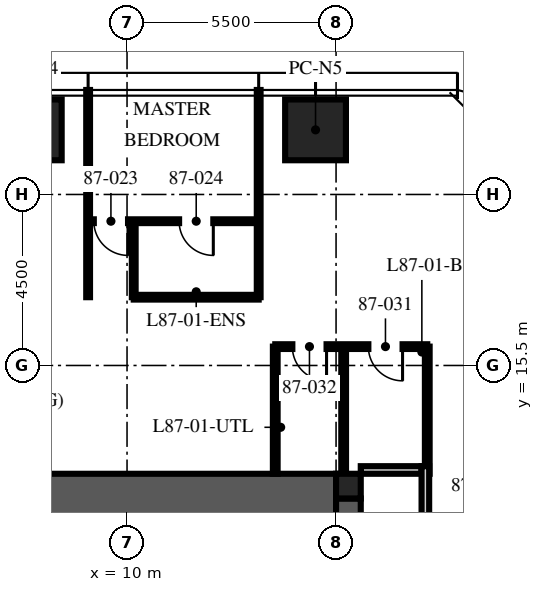
"""IFC4 building model, lengths in metres.
Left out: names, types, materials, properties, quantities, classifications, styles, units other than length and angle.
Written with IfcOpenShell. Run it as: python <this file> out.ifc"""

import sys

from ifc_helpers import new_model, si_unit, direction, frame, frame_2d, origin, origin_2d, place, context, subcontext, project, spatial, rectangle, extrude, element, fill, save


model = new_model("IFC4")
c1 = context("Model", 3, precision=1e-05, world=origin(), true_north=direction((0.0, 1.0)))
c2 = subcontext(c1, "Body", "Model", "MODEL_VIEW")
j1 = project(units=[si_unit("LENGTHUNIT", "METRE"), si_unit("PLANEANGLEUNIT", "RADIAN")], contexts=[c1])
p1 = place(None, origin())
s1 = spatial("IfcSite", under=j1, at=p1, CompositionType="ELEMENT")
p2 = place(p1, origin())
s2 = spatial("IfcBuilding", under=s1, at=p2, CompositionType="ELEMENT")
p3 = place(p2, frame((0.0, 0.0, 345.75)))
s3 = spatial("IfcBuildingStorey", under=s2, at=p3, CompositionType="ELEMENT", Elevation=345.75)
p4 = place(p3, frame((15.5, -12.0, -0.25), z_axis=(0.0, 0.0, 1.0), x_axis=(0.0, 1.0, 0.0)))
e1 = element("IfcWall", 1, at=p4, inside=s3, PredefinedType="SHEAR", context=c2, shape_type="SweptSolid", body=[
    extrude(rectangle(XDim=24.0, YDim=1.3, at=frame_2d((12.0, 0.0))), origin(), (0.0, 0.0, 1.0), 3.75),
])
p5 = place(p4, frame((3.125, 0.0, 0.25)))
e2 = element("IfcOpeningElement", 2, at=p5, cuts=e1, PredefinedType="OPENING", context=c2, shape_type="SweptSolid", body=[
    extrude(rectangle(XDim=1.2, YDim=2.1, at=frame_2d((0.6, 1.05))), frame((0.0, 0.66, 0.0), z_axis=(0.0, -1.0, 0.0), x_axis=(1.0, 0.0, 0.0)), (0.0, 0.0, 1.0), 1.32),
])
p6 = place(p4, frame((19.375, 0.0, 0.25)))
e3 = element("IfcOpeningElement", 3, at=p6, cuts=e1, PredefinedType="OPENING", context=c2, shape_type="SweptSolid", body=[
    extrude(rectangle(XDim=1.8, YDim=2.1, at=frame_2d((0.9, 1.05))), frame((0.0, 0.66, 0.0), z_axis=(0.0, -1.0, 0.0), x_axis=(1.0, 0.0, 0.0)), (0.0, 0.0, 1.0), 1.32),
])
p7 = place(p3, frame((-15.5, 12.0, -0.25), z_axis=(0.0, 0.0, 1.0), x_axis=(1.0, 0.0, 0.0)))
e4 = element("IfcWall", 4, at=p7, inside=s3, PredefinedType="SHEAR", context=c2, shape_type="SweptSolid", body=[
    extrude(rectangle(XDim=31.0, YDim=1.3, at=frame_2d((15.5, 0.0))), origin(), (0.0, 0.0, 1.0), 3.75),
])
p8 = place(p3, frame((15.825, 12.325, -0.25), z_axis=(0.0, 0.0, 1.0), x_axis=(1.0, 0.0, 0.0)))
e5 = element("IfcColumn", 5, at=p8, inside=s3, PredefinedType="COLUMN", context=c2, shape_type="SweptSolid", body=[
    extrude(rectangle(XDim=0.65, YDim=0.65, at=origin_2d()), origin(), (0.0, 0.0, 1.0), 3.75),
])
for number, where, z_axis, x_axis in (
    (6, (7.48, 21.7, 0.0), (0.0, 0.0, 1.0), (1.0, 0.0, 0.0)),
    (7, (14.96, 21.7, 0.0), (0.0, 0.0, 1.0), (1.0, 0.0, 0.0)),
):
    element("IfcColumn", number, at=place(p3, frame(where, z_axis=z_axis, x_axis=x_axis)), inside=s3, PredefinedType="COLUMN", context=c2, shape_type="SweptSolid", body=[
        extrude(rectangle(XDim=1.6, YDim=1.6, at=origin_2d()), origin(), (0.0, 0.0, 1.0), 3.75),
    ])
p9 = place(p3, frame((16.15, 12.75, 0.0), z_axis=(0.0, 0.0, 1.0), x_axis=(1.0, 0.0, 0.0)))
e8 = element("IfcWall", 8, at=p9, inside=s3, PredefinedType="PARTITIONING", context=c2, shape_type="SweptSolid", body=[
    extrude(rectangle(XDim=1.6, YDim=0.2, at=frame_2d((0.8, 0.0))), origin(), (0.0, 0.0, 1.0), 2.5),
])
for number, where, z_axis, x_axis in (
    (9, (13.464, 17.296, 0.0), (0.0, 0.0, 1.0), (0.0, 1.0, 0.0)),
    (10, (8.976, 17.296, 0.0), (0.0, 0.0, 1.0), (0.0, 1.0, 0.0)),
):
    element("IfcWall", number, at=place(p3, frame(where, z_axis=z_axis, x_axis=x_axis)), inside=s3, PredefinedType="PARTITIONING", context=c2, shape_type="SweptSolid", body=[
        extrude(rectangle(XDim=5.454, YDim=0.1, at=frame_2d((2.727, 0.0))), origin(), (0.0, 0.0, 1.0), 2.91),
    ])
p10 = place(p3, frame((13.464, 19.296, 0.0), z_axis=(0.0, 0.0, 1.0), x_axis=(-1.0, 0.0, 0.0)))
e11 = element("IfcWall", 11, at=p10, inside=s3, PredefinedType="PARTITIONING", context=c2, shape_type="SweptSolid", body=[
    extrude(rectangle(XDim=4.488, YDim=0.1, at=frame_2d((2.244, 0.0))), origin(), (0.0, 0.0, 1.0), 2.81),
])
p11 = place(p10, frame((3.438, 0.0, 0.0)))
e12 = element("IfcOpeningElement", 12, at=p11, cuts=e11, PredefinedType="OPENING", context=c2, shape_type="SweptSolid", body=[
    extrude(rectangle(XDim=0.9, YDim=2.1, at=frame_2d((0.45, 1.05))), frame((0.0, 0.06, 0.0), z_axis=(0.0, -1.0, 0.0), x_axis=(1.0, 0.0, 0.0)), (0.0, 0.0, 1.0), 0.12),
])
p12 = place(p10, frame((1.194, 0.0, 0.0)))
e13 = element("IfcOpeningElement", 13, at=p12, cuts=e11, PredefinedType="OPENING", context=c2, shape_type="SweptSolid", body=[
    extrude(rectangle(XDim=0.9, YDim=2.1, at=frame_2d((0.45, 1.05))), frame((0.0, 0.06, 0.0), z_axis=(0.0, -1.0, 0.0), x_axis=(1.0, 0.0, 0.0)), (0.0, 0.0, 1.0), 0.12),
])
p13 = place(p3, frame((10.176, 17.296, 0.0), z_axis=(0.0, 0.0, 1.0), x_axis=(0.0, 1.0, 0.0)))
e14 = element("IfcWall", 14, at=p13, inside=s3, PredefinedType="PARTITIONING", context=c2, shape_type="SweptSolid", body=[
    extrude(rectangle(XDim=2.0, YDim=0.1, at=frame_2d((1.0, 0.0))), origin(), (0.0, 0.0, 1.0), 3.5),
])
p14 = place(p3, frame((13.464, 17.296, 0.0), z_axis=(0.0, 0.0, 1.0), x_axis=(-1.0, 0.0, 0.0)))
e15 = element("IfcWall", 15, at=p14, inside=s3, PredefinedType="PARTITIONING", context=c2, shape_type="SweptSolid", body=[
    extrude(rectangle(XDim=3.288, YDim=0.125, at=frame_2d((1.644, 0.0))), origin(), (0.0, 0.0, 1.0), 2.81),
])
p15 = place(p3, frame((17.9, 15.996, 0.0), z_axis=(0.0, 0.0, 1.0), x_axis=(-1.0, 0.0, 0.0)))
e16 = element("IfcWall", 16, at=p15, inside=s3, PredefinedType="PARTITIONING", context=c2, shape_type="SweptSolid", body=[
    extrude(rectangle(XDim=4.0, YDim=0.125, at=frame_2d((2.0, 0.0))), origin(), (0.0, 0.0, 1.0), 2.5),
])
p16 = place(p15, frame((0.65, 0.0, 0.0)))
e17 = element("IfcOpeningElement", 17, at=p16, cuts=e16, PredefinedType="OPENING", context=c2, shape_type="SweptSolid", body=[
    extrude(rectangle(XDim=0.9, YDim=2.1, at=frame_2d((0.45, 1.05))), frame((0.0, 0.073, 0.0), z_axis=(0.0, -1.0, 0.0), x_axis=(1.0, 0.0, 0.0)), (0.0, 0.0, 1.0), 0.145),
])
p17 = place(p15, frame((2.65, 0.0, 0.0)))
e18 = element("IfcOpeningElement", 18, at=p17, cuts=e16, PredefinedType="OPENING", context=c2, shape_type="SweptSolid", body=[
    extrude(rectangle(XDim=0.9, YDim=2.1, at=frame_2d((0.45, 1.05))), frame((0.0, 0.073, 0.0), z_axis=(0.0, -1.0, 0.0), x_axis=(1.0, 0.0, 0.0)), (0.0, 0.0, 1.0), 0.145),
])
for number, where, z_axis, x_axis in (
    (19, (17.9, 12.65, 0.0), (0.0, 0.0, 1.0), (0.0, 1.0, 0.0)),
    (20, (15.7, 12.65, 0.0), (0.0, 0.0, 1.0), (0.0, 1.0, 0.0)),
):
    element("IfcWall", number, at=place(p3, frame(where, z_axis=z_axis, x_axis=x_axis)), inside=s3, PredefinedType="PARTITIONING", context=c2, shape_type="SweptSolid", body=[
        extrude(rectangle(XDim=3.346, YDim=0.125, at=frame_2d((1.673, 0.0))), origin(), (0.0, 0.0, 1.0), 2.5),
    ])
p18 = place(p3, frame((13.9, 12.65, 0.0), z_axis=(0.0, 0.0, 1.0), x_axis=(0.0, 1.0, 0.0)))
e21 = element("IfcWall", 21, at=p18, inside=s3, PredefinedType="PARTITIONING", context=c2, shape_type="SweptSolid", body=[
    extrude(rectangle(XDim=3.346, YDim=0.125, at=frame_2d((1.673, 0.0))), origin(), (0.0, 0.0, 1.0), 3.5),
])
p19 = place(p3, frame((17.85, -12.65, 0.0), z_axis=(0.0, 0.0, 1.0), x_axis=(0.0, 1.0, 0.0)))
e22 = element("IfcWall", 22, at=p19, inside=s3, PredefinedType="PARTITIONING", context=c2, shape_type="SweptSolid", body=[
    extrude(rectangle(XDim=25.5, YDim=0.2, at=frame_2d((12.75, 0.0))), origin(), (0.0, 0.0, 1.0), 2.81),
])
p20 = place(p19, frame((23.186, 0.0, 0.0)))
e23 = element("IfcOpeningElement", 23, at=p20, cuts=e22, PredefinedType="OPENING", context=c2, shape_type="SweptSolid", body=[
    extrude(rectangle(XDim=1.0, YDim=2.2, at=frame_2d((0.5, 1.1))), frame((0.0, 0.11, 0.0), z_axis=(0.0, -1.0, 0.0), x_axis=(1.0, 0.0, 0.0)), (0.0, 0.0, 1.0), 0.22),
])
p21 = place(p19, frame((4.9, 0.0, 0.0)))
e24 = element("IfcOpeningElement", 24, at=p21, cuts=e22, PredefinedType="OPENING", context=c2, shape_type="SweptSolid", body=[
    extrude(rectangle(XDim=1.0, YDim=2.2, at=frame_2d((0.5, 1.1))), frame((0.0, 0.11, 0.0), z_axis=(0.0, -1.0, 0.0), x_axis=(1.0, 0.0, 0.0)), (0.0, 0.0, 1.0), 0.22),
])
p22 = place(p11, origin())
e25 = element("IfcDoor", 25, at=p22, inside=s3, OperationType="SINGLE_SWING_LEFT", PredefinedType="DOOR", context=c2, shape_type="SweptSolid", body=[
    extrude(rectangle(XDim=0.9, YDim=2.1, at=frame_2d((0.45, 1.05))), frame((0.0, 0.025, 0.0), z_axis=(0.0, -1.0, 0.0), x_axis=(1.0, 0.0, 0.0)), (0.0, 0.0, 1.0), 0.05),
])
fill(e12, e25)
p23 = place(p12, origin())
e26 = element("IfcDoor", 26, at=p23, inside=s3, OperationType="SINGLE_SWING_LEFT", PredefinedType="DOOR", context=c2, shape_type="SweptSolid", body=[
    extrude(rectangle(XDim=0.9, YDim=2.1, at=frame_2d((0.45, 1.05))), frame((0.0, 0.025, 0.0), z_axis=(0.0, -1.0, 0.0), x_axis=(1.0, 0.0, 0.0)), (0.0, 0.0, 1.0), 0.05),
])
fill(e13, e26)
p24 = place(p16, origin())
e27 = element("IfcDoor", 27, at=p24, inside=s3, OperationType="SINGLE_SWING_LEFT", PredefinedType="DOOR", context=c2, shape_type="SweptSolid", body=[
    extrude(rectangle(XDim=0.9, YDim=2.1, at=frame_2d((0.45, 1.05))), frame((0.0, 0.025, 0.0), z_axis=(0.0, -1.0, 0.0), x_axis=(1.0, 0.0, 0.0)), (0.0, 0.0, 1.0), 0.05),
])
fill(e17, e27)
p25 = place(p17, origin())
e28 = element("IfcDoor", 28, at=p25, inside=s3, OperationType="SINGLE_SWING_LEFT", PredefinedType="DOOR", context=c2, shape_type="SweptSolid", body=[
    extrude(rectangle(XDim=0.9, YDim=2.1, at=frame_2d((0.45, 1.05))), frame((0.0, 0.025, 0.0), z_axis=(0.0, -1.0, 0.0), x_axis=(1.0, 0.0, 0.0)), (0.0, 0.0, 1.0), 0.05),
])
fill(e18, e28)
save(model, sys.argv[1])
